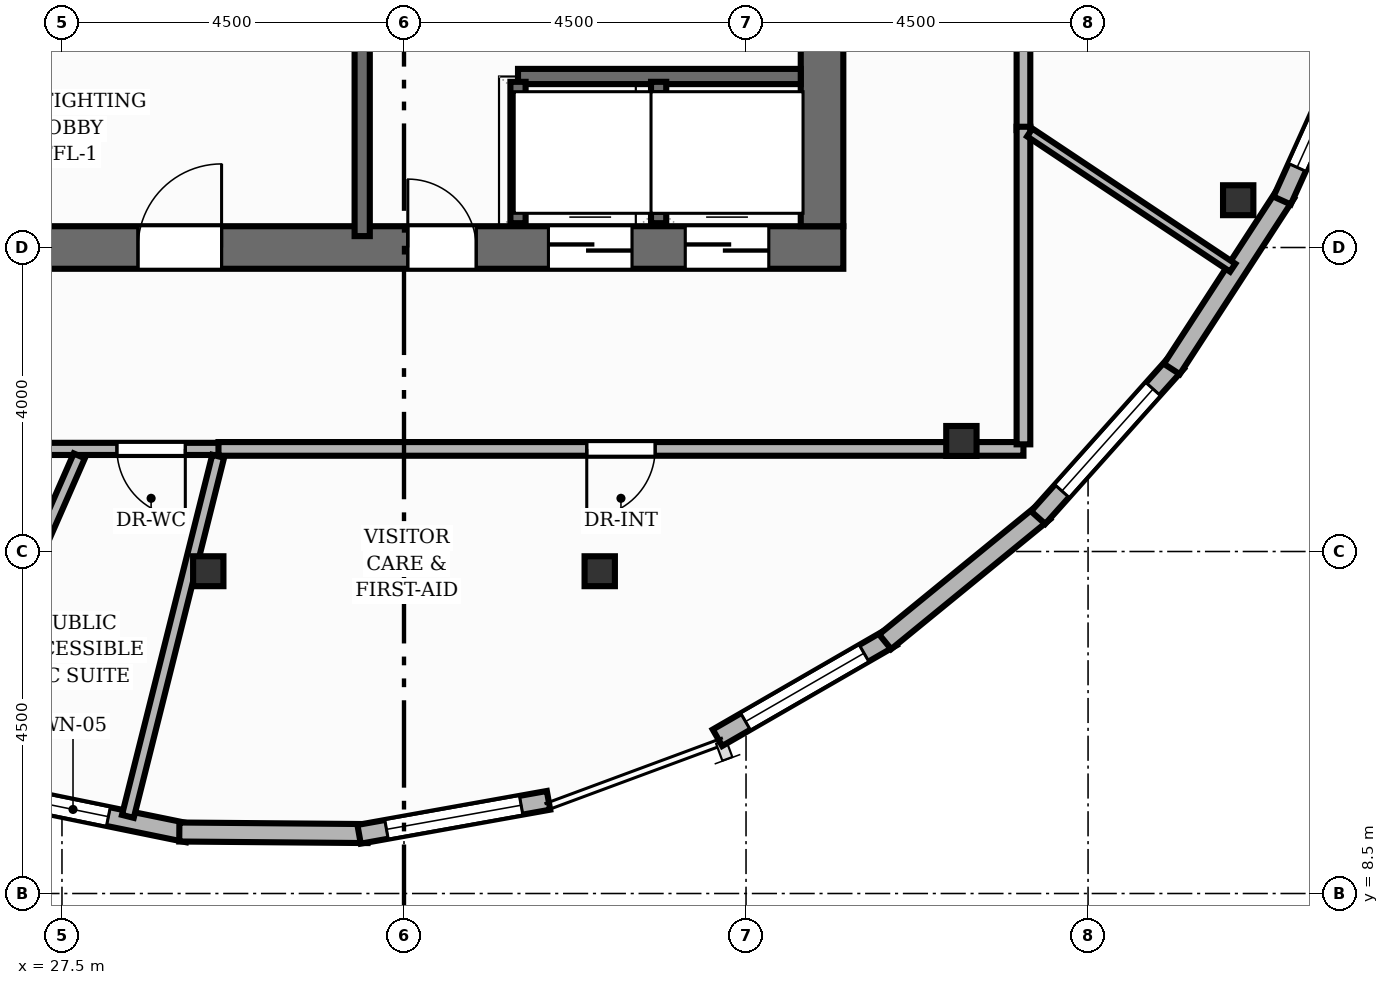
"""IFC4 building model, lengths in metres.
Left out: names, types, materials, properties, quantities, classifications, styles, units other than length and angle.
Written with IfcOpenShell. Run it as: python <this file> out.ifc"""

import sys

from ifc_helpers import new_model, si_unit, direction, frame, frame_2d, origin, origin_2d, place, context, subcontext, project, spatial, rectangle, i_section, extrude, element, fill, save


model = new_model("IFC4")
c1 = context("Model", 3, precision=1e-05, world=origin(), true_north=direction((0.0, 1.0)))
c2 = subcontext(c1, "Body", "Model", "MODEL_VIEW")
j1 = project(units=[si_unit("LENGTHUNIT", "METRE"), si_unit("PLANEANGLEUNIT", "RADIAN")], contexts=[c1])
p1 = place(None, origin())
s1 = spatial("IfcSite", under=j1, at=p1, CompositionType="ELEMENT")
p2 = place(p1, origin())
s2 = spatial("IfcBuilding", under=s1, at=p2, CompositionType="ELEMENT")
p3 = place(p2, frame((0.0, 0.0, 243.04)))
s3 = spatial("IfcBuildingStorey", under=s2, at=p3, CompositionType="ELEMENT", Elevation=243.04)
p4 = place(p3, frame((26.22, 17.0, 0.0), z_axis=(0.0, 0.0, 1.0), x_axis=(1.0, 0.0, 0.0)))
e1 = element("IfcWall", 1, at=p4, inside=s3, PredefinedType="SHEAR", context=c2, shape_type="SweptSolid", body=[
    extrude(rectangle(XDim=11.56, YDim=0.56, at=frame_2d((5.78, 0.0))), origin(), (0.0, 0.0, 1.0), 3.84),
])
p5 = place(p4, frame((2.28, 0.0, 0.0)))
e2 = element("IfcOpeningElement", 2, at=p5, cuts=e1, PredefinedType="OPENING", context=c2, shape_type="SweptSolid", body=[
    extrude(rectangle(XDim=1.1, YDim=2.15, at=frame_2d((0.55, 1.075))), frame((0.0, 0.29, 0.0), z_axis=(0.0, -1.0, 0.0), x_axis=(1.0, 0.0, 0.0)), (0.0, 0.0, 1.0), 0.58),
])
p6 = place(p4, frame((7.68, 0.0, 0.0)))
e3 = element("IfcOpeningElement", 3, at=p6, cuts=e1, PredefinedType="OPENING", context=c2, shape_type="SweptSolid", body=[
    extrude(rectangle(XDim=1.1, YDim=2.15, at=frame_2d((0.55, 1.075))), frame((0.0, 0.29, 0.0), z_axis=(0.0, -1.0, 0.0), x_axis=(1.0, 0.0, 0.0)), (0.0, 0.0, 1.0), 0.58),
])
p7 = place(p4, frame((9.48, 0.0, 0.0)))
e4 = element("IfcOpeningElement", 4, at=p7, cuts=e1, PredefinedType="OPENING", context=c2, shape_type="SweptSolid", body=[
    extrude(rectangle(XDim=1.1, YDim=2.15, at=frame_2d((0.55, 1.075))), frame((0.0, 0.29, 0.0), z_axis=(0.0, -1.0, 0.0), x_axis=(1.0, 0.0, 0.0)), (0.0, 0.0, 1.0), 0.58),
])
p8 = place(p4, frame((5.83, 0.0, 0.0)))
e5 = element("IfcOpeningElement", 5, at=p8, cuts=e1, PredefinedType="OPENING", context=c2, shape_type="SweptSolid", body=[
    extrude(rectangle(XDim=0.9, YDim=2.1, at=frame_2d((0.45, 1.05))), frame((0.0, 0.29, 0.0), z_axis=(0.0, -1.0, 0.0), x_axis=(1.0, 0.0, 0.0)), (0.0, 0.0, 1.0), 0.58),
])
p9 = place(p3, frame((37.5, 17.28, 0.0), z_axis=(0.0, 0.0, 1.0), x_axis=(0.0, 1.0, 0.0)))
e6 = element("IfcWall", 6, at=p9, inside=s3, PredefinedType="SHEAR", context=c2, shape_type="SweptSolid", body=[
    extrude(rectangle(XDim=13.44, YDim=0.56, at=frame_2d((6.72, 0.0))), origin(), (0.0, 0.0, 1.0), 3.84),
])
for number, where, z_axis, x_axis in (
    (7, (29.425, 12.74, 0.0), (0.0, 0.0, 1.0), (1.0, 0.0, 0.0)),
    (8, (34.575, 12.74, 0.0), (0.0, 0.0, 1.0), (1.0, 0.0, 0.0)),
    (9, (39.333, 14.455, 0.0), (0.0, 0.0, 1.0), (1.0, 0.0, 0.0)),
    (10, (42.975, 17.622, 0.0), (0.0, 0.0, 1.0), (1.0, 0.0, 0.0)),
):
    element("IfcColumn", number, at=place(p3, frame(where, z_axis=z_axis, x_axis=x_axis)), inside=s3, PredefinedType="COLUMN", context=c2, shape_type="SweptSolid", body=[
        extrude(i_section(OverallWidth=0.399, OverallDepth=0.394, WebThickness=0.023, FlangeThickness=0.037, at=origin_2d()), origin(), (0.0, 0.0, 1.0), 3.84),
    ])
p10 = place(p3, frame((29.157, 9.297, 0.0), z_axis=(0.0, 0.0, 1.0), x_axis=(-0.979739512471, 0.200276028779, 0.0)))
e11 = element("IfcWall", 11, at=p10, inside=s3, PredefinedType="SOLIDWALL", context=c2, shape_type="SweptSolid", body=[
    extrude(rectangle(XDim=2.437, YDim=0.25, at=frame_2d((1.218, 0.0))), origin(), (0.0, 0.0, 1.0), 3.52),
])
p11 = place(p10, frame((1.068, 0.0, 0.85)))
e12 = element("IfcOpeningElement", 12, at=p11, cuts=e11, PredefinedType="OPENING", context=c2, shape_type="SweptSolid", body=[
    extrude(rectangle(XDim=0.95, YDim=1.45, at=frame_2d((0.475, 0.725))), frame((0.0, 0.135, 0.0), z_axis=(0.0, -1.0, 0.0), x_axis=(1.0, 0.0, 0.0)), (0.0, 0.0, 1.0), 0.27),
])
p12 = place(p3, frame((31.521, 9.289, 0.0), z_axis=(0.0, 0.0, 1.0), x_axis=(-0.999965743314, 0.008277209543, 0.0)))
e13 = element("IfcWall", 13, at=p12, inside=s3, PredefinedType="SOLIDWALL", context=c2, shape_type="SweptSolid", body=[
    extrude(rectangle(XDim=2.478, YDim=0.25, at=frame_2d((1.239, 0.0))), origin(), (0.0, 0.0, 1.0), 3.52),
])
p13 = place(p3, frame((33.902, 9.726, 0.0), z_axis=(0.0, 0.0, 1.0), x_axis=(-0.984294411641, -0.176534730896, 0.0)))
e14 = element("IfcWall", 14, at=p13, inside=s3, PredefinedType="SOLIDWALL", context=c2, shape_type="SweptSolid", body=[
    extrude(rectangle(XDim=2.532, YDim=0.25, at=frame_2d((1.266, 0.0))), origin(), (0.0, 0.0, 1.0), 3.52),
])
p14 = place(p13, frame((0.366, 0.0, 0.85)))
e15 = element("IfcOpeningElement", 15, at=p14, cuts=e14, PredefinedType="OPENING", context=c2, shape_type="SweptSolid", body=[
    extrude(rectangle(XDim=1.8, YDim=2.0, at=frame_2d((0.9, 1.0))), frame((0.0, 0.135, 0.0), z_axis=(0.0, -1.0, 0.0), x_axis=(1.0, 0.0, 0.0)), (0.0, 0.0, 1.0), 0.27),
])
p15 = place(p3, frame((38.42, 11.875, 0.0), z_axis=(0.0, 0.0, 1.0), x_axis=(-0.86612117946, -0.49983407496, 0.0)))
e16 = element("IfcWall", 16, at=p15, inside=s3, PredefinedType="SOLIDWALL", context=c2, shape_type="SweptSolid", body=[
    extrude(rectangle(XDim=2.651, YDim=0.25, at=frame_2d((1.325, 0.0))), origin(), (0.0, 0.0, 1.0), 3.52),
])
p16 = place(p15, frame((0.425, 0.0, 0.85)))
e17 = element("IfcOpeningElement", 17, at=p16, cuts=e16, PredefinedType="OPENING", context=c2, shape_type="SweptSolid", body=[
    extrude(rectangle(XDim=1.8, YDim=2.0, at=frame_2d((0.9, 1.0))), frame((0.0, 0.135, 0.0), z_axis=(0.0, -1.0, 0.0), x_axis=(1.0, 0.0, 0.0)), (0.0, 0.0, 1.0), 0.27),
])
p17 = place(p3, frame((40.422, 13.521, 0.0), z_axis=(0.0, 0.0, 1.0), x_axis=(-0.774355745343, -0.632750487676, 0.0)))
e18 = element("IfcWall", 18, at=p17, inside=s3, PredefinedType="SOLIDWALL", context=c2, shape_type="SweptSolid", body=[
    extrude(rectangle(XDim=2.702, YDim=0.25, at=frame_2d((1.351, 0.0))), origin(), (0.0, 0.0, 1.0), 3.52),
])
p18 = place(p3, frame((42.168, 15.488, 0.0), z_axis=(0.0, 0.0, 1.0), x_axis=(-0.666463852193, -0.745537345624, 0.0)))
e19 = element("IfcWall", 19, at=p18, inside=s3, PredefinedType="SOLIDWALL", context=c2, shape_type="SweptSolid", body=[
    extrude(rectangle(XDim=2.739, YDim=0.25, at=frame_2d((1.369, 0.0))), origin(), (0.0, 0.0, 1.0), 3.52),
])
p19 = place(p18, frame((0.469, 0.0, 0.85)))
e20 = element("IfcOpeningElement", 20, at=p19, cuts=e19, PredefinedType="OPENING", context=c2, shape_type="SweptSolid", body=[
    extrude(rectangle(XDim=1.8, YDim=2.0, at=frame_2d((0.9, 1.0))), frame((0.0, 0.135, 0.0), z_axis=(0.0, -1.0, 0.0), x_axis=(1.0, 0.0, 0.0)), (0.0, 0.0, 1.0), 0.27),
])
p20 = place(p3, frame((43.605, 17.713, 0.0), z_axis=(0.0, 0.0, 1.0), x_axis=(-0.545041246002, -0.838409231913, 0.0)))
e21 = element("IfcWall", 21, at=p20, inside=s3, PredefinedType="SOLIDWALL", context=c2, shape_type="SweptSolid", body=[
    extrude(rectangle(XDim=2.758, YDim=0.25, at=frame_2d((1.379, 0.0))), origin(), (0.0, 0.0, 1.0), 3.52),
])
p21 = place(p3, frame((44.69, 20.131, 0.0), z_axis=(0.0, 0.0, 1.0), x_axis=(-0.411961415151, -0.911201290839, 0.0)))
e22 = element("IfcWall", 22, at=p21, inside=s3, PredefinedType="SOLIDWALL", context=c2, shape_type="SweptSolid", body=[
    extrude(rectangle(XDim=2.758, YDim=0.25, at=frame_2d((1.379, 0.0))), origin(), (0.0, 0.0, 1.0), 3.52),
])
p22 = place(p21, frame((0.479, 0.0, 0.85)))
e23 = element("IfcOpeningElement", 23, at=p22, cuts=e22, PredefinedType="OPENING", context=c2, shape_type="SweptSolid", body=[
    extrude(rectangle(XDim=1.8, YDim=2.0, at=frame_2d((0.9, 1.0))), frame((0.0, 0.135, 0.0), z_axis=(0.0, -1.0, 0.0), x_axis=(1.0, 0.0, 0.0)), (0.0, 0.0, 1.0), 0.27),
])
p23 = place(p3, frame((31.45, 17.15, 0.0), z_axis=(0.0, 0.0, 1.0), x_axis=(0.0, 1.0, 0.0)))
e24 = element("IfcWall", 24, at=p23, inside=s3, PredefinedType="SHEAR", context=c2, shape_type="SweptSolid", body=[
    extrude(rectangle(XDim=3.5, YDim=0.2, at=frame_2d((1.75, 0.0))), origin(), (0.0, 0.0, 1.0), 3.84),
])
p24 = place(p3, frame((33.5, 19.25, 0.0), z_axis=(0.0, 0.0, 1.0), x_axis=(1.0, 0.0, 0.0)))
e25 = element("IfcWall", 25, at=p24, inside=s3, PredefinedType="SHEAR", context=c2, shape_type="SweptSolid", body=[
    extrude(rectangle(XDim=3.72, YDim=0.2, at=frame_2d((1.86, 0.0))), origin(), (0.0, 0.0, 1.0), 3.84),
])
for number, where, z_axis, x_axis in (
    (26, (33.5, 17.32, 0.0), (0.0, 0.0, 1.0), (0.0, 1.0, 0.0)),
    (27, (35.35, 17.32, 0.0), (0.0, 0.0, 1.0), (0.0, 1.0, 0.0)),
):
    element("IfcWall", number, at=place(p3, frame(where, z_axis=z_axis, x_axis=x_axis)), inside=s3, PredefinedType="SHEAR", context=c2, shape_type="SweptSolid", body=[
        extrude(rectangle(XDim=1.86, YDim=0.2, at=frame_2d((0.93, 0.0))), origin(), (0.0, 0.0, 1.0), 3.84),
    ])
p25 = place(p3, frame((40.15, 33.59, 0.0), z_axis=(0.0, 0.0, 1.0), x_axis=(0.0, -1.0, 0.0)))
e28 = element("IfcWall", 28, at=p25, inside=s3, PredefinedType="PARTITIONING", context=c2, shape_type="SweptSolid", body=[
    extrude(rectangle(XDim=15.045, YDim=0.18, at=frame_2d((7.523, 0.0))), origin(), (0.0, 0.0, 1.0), 3.515),
])
p26 = place(p25, frame((8.749, 0.0, 0.0)))
e29 = element("IfcOpeningElement", 29, at=p26, cuts=e28, PredefinedType="OPENING", context=c2, shape_type="SweptSolid", body=[
    extrude(rectangle(XDim=0.9, YDim=2.1, at=frame_2d((0.45, 1.05))), frame((0.0, 0.1, 0.0), z_axis=(0.0, -1.0, 0.0), x_axis=(1.0, 0.0, 0.0)), (0.0, 0.0, 1.0), 0.2),
])
p27 = place(p3, frame((29.6, 14.35, 0.0), z_axis=(0.0, 0.0, 1.0), x_axis=(-1.0, 0.0, 0.0)))
e30 = element("IfcWall", 30, at=p27, inside=s3, PredefinedType="PLUMBINGWALL", context=c2, shape_type="SweptSolid", body=[
    extrude(rectangle(XDim=5.75, YDim=0.16, at=frame_2d((2.875, 0.0))), origin(), (0.0, 0.0, 1.0), 3.048),
])
p28 = place(p27, frame((0.477, 0.0, 0.0)))
e31 = element("IfcOpeningElement", 31, at=p28, cuts=e30, PredefinedType="OPENING", context=c2, shape_type="SweptSolid", body=[
    extrude(rectangle(XDim=0.9, YDim=2.1, at=frame_2d((0.45, 1.05))), frame((0.0, 0.09, 0.0), z_axis=(0.0, -1.0, 0.0), x_axis=(1.0, 0.0, 0.0)), (0.0, 0.0, 1.0), 0.18),
])
p29 = place(p3, frame((40.15, 14.35, 0.0), z_axis=(0.0, 0.0, 1.0), x_axis=(-1.0, 0.0, 0.0)))
e32 = element("IfcWall", 32, at=p29, inside=s3, PredefinedType="PARTITIONING", context=c2, shape_type="SweptSolid", body=[
    extrude(rectangle(XDim=10.591, YDim=0.18, at=frame_2d((5.295, 0.0))), origin(), (0.0, 0.0, 1.0), 3.048),
])
p30 = place(p29, frame((4.845, 0.0, 0.0)))
e33 = element("IfcOpeningElement", 33, at=p30, cuts=e32, PredefinedType="OPENING", context=c2, shape_type="SweptSolid", body=[
    extrude(rectangle(XDim=0.9, YDim=2.1, at=frame_2d((0.45, 1.05))), frame((0.0, 0.1, 0.0), z_axis=(0.0, -1.0, 0.0), x_axis=(1.0, 0.0, 0.0)), (0.0, 0.0, 1.0), 0.2),
])
p31 = place(p3, frame((40.15, 18.589, 0.0), z_axis=(0.0, 0.0, 1.0), x_axis=(0.0, -1.0, 0.0)))
e34 = element("IfcWall", 34, at=p31, inside=s3, PredefinedType="PARTITIONING", context=c2, shape_type="SweptSolid", body=[
    extrude(rectangle(XDim=4.179, YDim=0.18, at=frame_2d((2.089, 0.0))), origin(), (0.0, 0.0, 1.0), 3.515),
])
p32 = place(p3, frame((27.728, 14.258, 0.0), z_axis=(0.0, 0.0, 1.0), x_axis=(-0.40164607795, -0.91579497054, 0.0)))
e35 = element("IfcWall", 35, at=p32, inside=s3, PredefinedType="PLUMBINGWALL", context=c2, shape_type="SweptSolid", body=[
    extrude(rectangle(XDim=4.427, YDim=0.16, at=frame_2d((2.213, 0.0))), origin(), (0.0, 0.0, 1.0), 3.515),
])
p33 = place(p3, frame((28.367, 9.515, 0.0), z_axis=(0.0, 0.0, 1.0), x_axis=(0.243299941273, 0.969951101127, 0.0)))
e36 = element("IfcWall", 36, at=p33, inside=s3, PredefinedType="PLUMBINGWALL", context=c2, shape_type="SweptSolid", body=[
    extrude(rectangle(XDim=4.885, YDim=0.16, at=frame_2d((2.442, 0.0))), origin(), (0.0, 0.0, 1.0), 2.963),
])
p34 = place(p3, frame((40.233, 18.513, 0.0), z_axis=(0.0, 0.0, 1.0), x_axis=(0.832167333271, -0.554524597685, 0.0)))
e37 = element("IfcWall", 37, at=p34, inside=s3, PredefinedType="PARTITIONING", context=c2, shape_type="SweptSolid", body=[
    extrude(rectangle(XDim=3.209, YDim=0.125, at=frame_2d((1.604, 0.0))), origin(), (0.0, 0.0, 1.0), 3.515),
])
p35 = place(p11, origin())
e38 = element("IfcWindow", 38, at=p35, inside=s3, PartitioningType="SINGLE_PANEL", PredefinedType="WINDOW", context=c2, shape_type="SweptSolid", body=[
    extrude(rectangle(XDim=0.95, YDim=1.45, at=frame_2d((0.475, 0.725))), frame((0.0, 0.03, 0.0), z_axis=(0.0, -1.0, 0.0), x_axis=(1.0, 0.0, 0.0)), (0.0, 0.0, 1.0), 0.06),
])
fill(e12, e38)
p36 = place(p14, origin())
e39 = element("IfcWindow", 39, at=p36, inside=s3, PartitioningType="SINGLE_PANEL", PredefinedType="WINDOW", context=c2, shape_type="SweptSolid", body=[
    extrude(rectangle(XDim=1.8, YDim=2.0, at=frame_2d((0.9, 1.0))), frame((0.0, 0.03, 0.0), z_axis=(0.0, -1.0, 0.0), x_axis=(1.0, 0.0, 0.0)), (0.0, 0.0, 1.0), 0.06),
])
fill(e15, e39)
p37 = place(p16, origin())
e40 = element("IfcWindow", 40, at=p37, inside=s3, PartitioningType="SINGLE_PANEL", PredefinedType="WINDOW", context=c2, shape_type="SweptSolid", body=[
    extrude(rectangle(XDim=1.8, YDim=2.0, at=frame_2d((0.9, 1.0))), frame((0.0, 0.03, 0.0), z_axis=(0.0, -1.0, 0.0), x_axis=(1.0, 0.0, 0.0)), (0.0, 0.0, 1.0), 0.06),
])
fill(e17, e40)
p38 = place(p19, origin())
e41 = element("IfcWindow", 41, at=p38, inside=s3, PartitioningType="SINGLE_PANEL", PredefinedType="WINDOW", context=c2, shape_type="SweptSolid", body=[
    extrude(rectangle(XDim=1.8, YDim=2.0, at=frame_2d((0.9, 1.0))), frame((0.0, 0.03, 0.0), z_axis=(0.0, -1.0, 0.0), x_axis=(1.0, 0.0, 0.0)), (0.0, 0.0, 1.0), 0.06),
])
fill(e20, e41)
p39 = place(p22, origin())
e42 = element("IfcWindow", 42, at=p39, inside=s3, PartitioningType="SINGLE_PANEL", PredefinedType="WINDOW", context=c2, shape_type="SweptSolid", body=[
    extrude(rectangle(XDim=1.8, YDim=2.0, at=frame_2d((0.9, 1.0))), frame((0.0, 0.03, 0.0), z_axis=(0.0, -1.0, 0.0), x_axis=(1.0, 0.0, 0.0)), (0.0, 0.0, 1.0), 0.06),
])
fill(e23, e42)
p40 = place(p5, origin())
e43 = element("IfcDoor", 43, at=p40, inside=s3, OperationType="SINGLE_SWING_RIGHT", PredefinedType="DOOR", context=c2, shape_type="SweptSolid", body=[
    extrude(rectangle(XDim=1.1, YDim=2.15, at=frame_2d((0.55, 1.075))), frame((0.0, 0.025, 0.0), z_axis=(0.0, -1.0, 0.0), x_axis=(1.0, 0.0, 0.0)), (0.0, 0.0, 1.0), 0.05),
])
fill(e2, e43)
p41 = place(p6, origin())
e44 = element("IfcDoor", 44, at=p41, inside=s3, OperationType="DOUBLE_DOOR_SLIDING", PredefinedType="DOOR", context=c2, shape_type="SweptSolid", body=[
    extrude(rectangle(XDim=1.1, YDim=2.15, at=frame_2d((0.55, 1.075))), frame((0.0, 0.025, 0.0), z_axis=(0.0, -1.0, 0.0), x_axis=(1.0, 0.0, 0.0)), (0.0, 0.0, 1.0), 0.05),
])
fill(e3, e44)
p42 = place(p7, origin())
e45 = element("IfcDoor", 45, at=p42, inside=s3, OperationType="DOUBLE_DOOR_SLIDING", PredefinedType="DOOR", context=c2, shape_type="SweptSolid", body=[
    extrude(rectangle(XDim=1.1, YDim=2.15, at=frame_2d((0.55, 1.075))), frame((0.0, 0.025, 0.0), z_axis=(0.0, -1.0, 0.0), x_axis=(1.0, 0.0, 0.0)), (0.0, 0.0, 1.0), 0.05),
])
fill(e4, e45)
p43 = place(p8, origin())
e46 = element("IfcDoor", 46, at=p43, inside=s3, OperationType="SINGLE_SWING_LEFT", PredefinedType="DOOR", context=c2, shape_type="SweptSolid", body=[
    extrude(rectangle(XDim=0.9, YDim=2.1, at=frame_2d((0.45, 1.05))), frame((0.0, 0.025, 0.0), z_axis=(0.0, -1.0, 0.0), x_axis=(1.0, 0.0, 0.0)), (0.0, 0.0, 1.0), 0.05),
])
fill(e5, e46)
p44 = place(p30, origin())
e47 = element("IfcDoor", 47, at=p44, inside=s3, OperationType="SINGLE_SWING_RIGHT", PredefinedType="DOOR", context=c2, shape_type="SweptSolid", body=[
    extrude(rectangle(XDim=0.9, YDim=2.1, at=frame_2d((0.45, 1.05))), frame((0.0, 0.025, 0.0), z_axis=(0.0, -1.0, 0.0), x_axis=(1.0, 0.0, 0.0)), (0.0, 0.0, 1.0), 0.05),
])
fill(e33, e47)
p45 = place(p28, origin())
e48 = element("IfcDoor", 48, at=p45, inside=s3, OperationType="SINGLE_SWING_LEFT", PredefinedType="DOOR", context=c2, shape_type="SweptSolid", body=[
    extrude(rectangle(XDim=0.9, YDim=2.1, at=frame_2d((0.45, 1.05))), frame((0.0, 0.025, 0.0), z_axis=(0.0, -1.0, 0.0), x_axis=(1.0, 0.0, 0.0)), (0.0, 0.0, 1.0), 0.05),
])
fill(e31, e48)
save(model, sys.argv[1])
